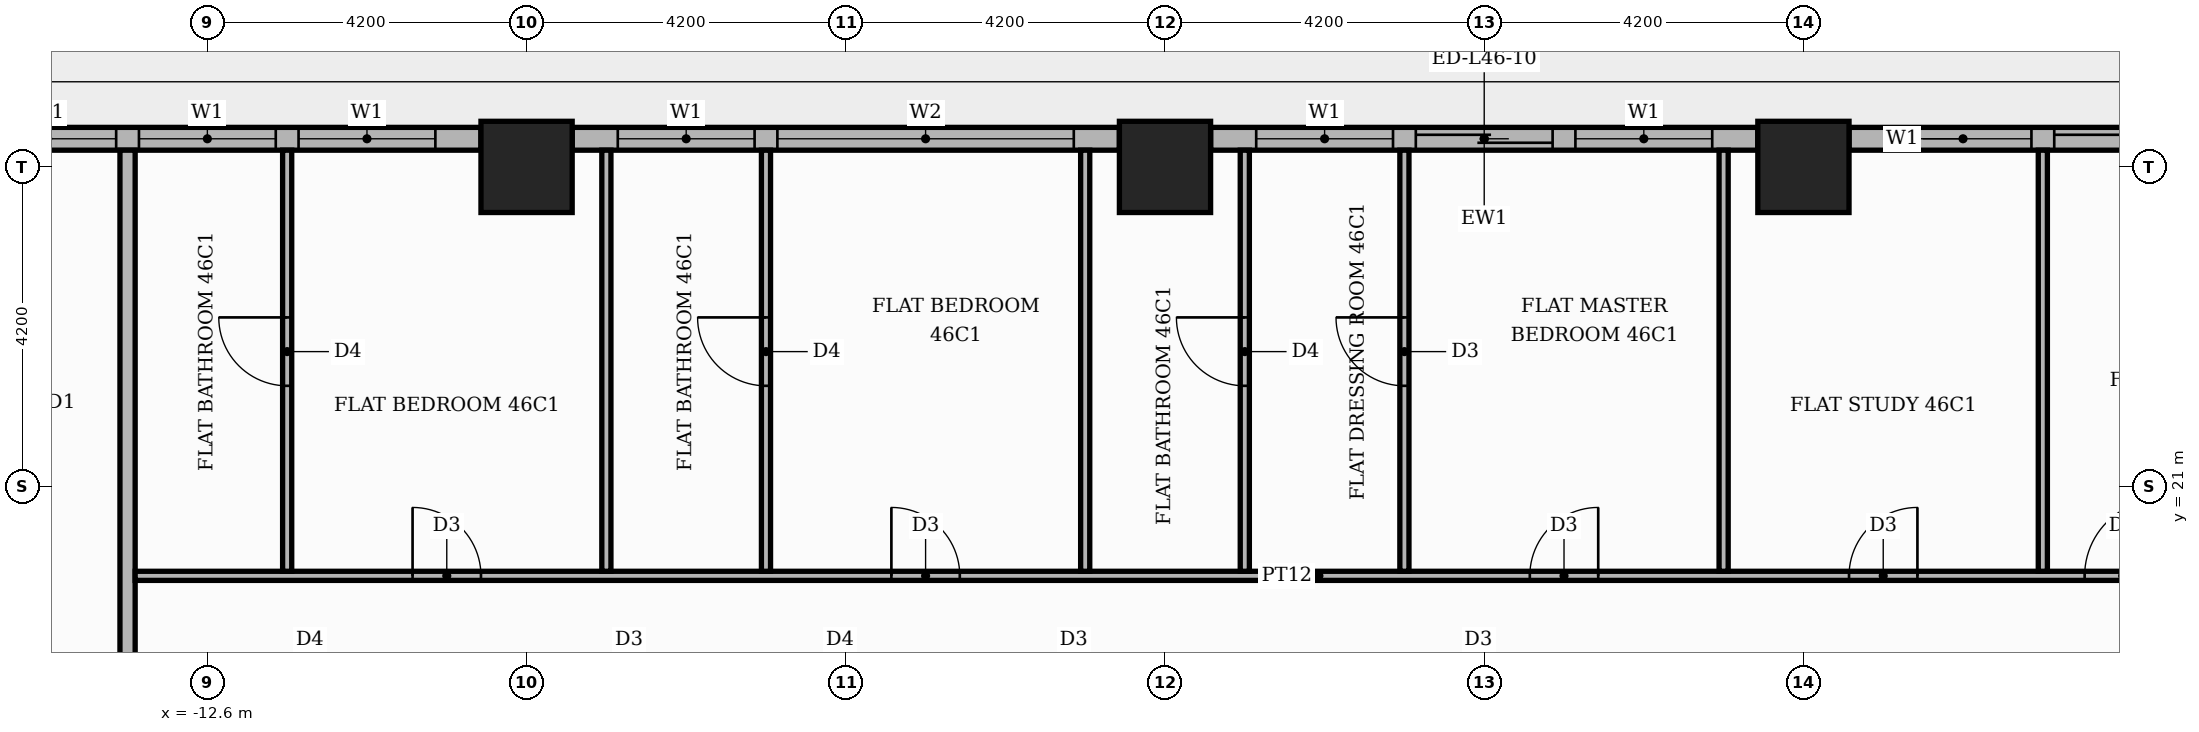
"""IFC4 building model, lengths in metres.
Left out: names, types, materials, properties, quantities, classifications, styles, units other than length and angle.
Written with IfcOpenShell. Run it as: python <this file> out.ifc"""

import sys

from ifc_helpers import new_model, si_unit, direction, frame, frame_2d, origin, origin_2d, place, context, subcontext, project, spatial, rectangle, extrude, element, fill, save


model = new_model("IFC4")
c1 = context("Model", 3, precision=1e-05, world=origin(), true_north=direction((0.0, 1.0)))
c2 = subcontext(c1, "Body", "Model", "MODEL_VIEW")
j1 = project(units=[si_unit("LENGTHUNIT", "METRE"), si_unit("PLANEANGLEUNIT", "RADIAN")], contexts=[c1])
p1 = place(None, origin())
s1 = spatial("IfcSite", under=j1, at=p1, CompositionType="ELEMENT")
p2 = place(p1, origin())
s2 = spatial("IfcBuilding", under=s1, at=p2, CompositionType="ELEMENT")
p3 = place(p2, frame((0.0, 0.0, 196.2)))
s3 = spatial("IfcBuildingStorey", under=s2, at=p3, CompositionType="ELEMENT", Elevation=196.2)
for number, where, z_axis, x_axis in (
    (1, (0.0, 25.2, 0.0), (0.0, 0.0, 1.0), (1.0, 0.0, 0.0)),
    (2, (-8.4, 25.2, 0.0), (0.0, 0.0, 1.0), (1.0, 0.0, 0.0)),
    (3, (8.4, 25.2, 0.0), (0.0, 0.0, 1.0), (1.0, 0.0, 0.0)),
):
    element("IfcColumn", number, at=place(p3, frame(where, z_axis=z_axis, x_axis=x_axis)), inside=s3, PredefinedType="COLUMN", context=c2, shape_type="SweptSolid", body=[
        extrude(rectangle(XDim=1.2, YDim=1.2, at=origin_2d()), origin(), (0.0, 0.0, 1.0), 3.9),
    ])
p4 = place(p3, frame((16.2, 25.57, 0.0), z_axis=(0.0, 0.0, 1.0), x_axis=(-1.0, 0.0, 0.0)))
e4 = element("IfcWall", 4, at=p4, inside=s3, PredefinedType="STANDARD", context=c2, shape_type="SweptSolid", body=[
    extrude(rectangle(XDim=7.2, YDim=0.3, at=frame_2d((3.6, 0.0))), origin(), (0.0, 0.0, 1.0), 3.48),
])
p5 = place(p4, frame((0.6, 0.0, 0.0)))
e5 = element("IfcOpeningElement", 5, at=p5, cuts=e4, PredefinedType="OPENING", context=c2, shape_type="SweptSolid", body=[
    extrude(rectangle(XDim=3.9, YDim=2.4, at=frame_2d((1.95, 1.2))), frame((0.0, 0.16, 0.0), z_axis=(0.0, -1.0, 0.0), x_axis=(1.0, 0.0, 0.0)), (0.0, 0.0, 1.0), 0.32),
])
p6 = place(p4, frame((4.8, 0.0, 0.9)))
e6 = element("IfcOpeningElement", 6, at=p6, cuts=e4, PredefinedType="OPENING", context=c2, shape_type="SweptSolid", body=[
    extrude(rectangle(XDim=1.8, YDim=2.1, at=frame_2d((0.9, 1.05))), frame((0.0, 0.16, 0.0), z_axis=(0.0, -1.0, 0.0), x_axis=(1.0, 0.0, 0.0)), (0.0, 0.0, 1.0), 0.32),
])
p7 = place(p3, frame((7.8, 25.57, 0.0), z_axis=(0.0, 0.0, 1.0), x_axis=(-1.0, 0.0, 0.0)))
e7 = element("IfcWall", 7, at=p7, inside=s3, PredefinedType="STANDARD", context=c2, shape_type="SweptSolid", body=[
    extrude(rectangle(XDim=7.2, YDim=0.3, at=frame_2d((3.6, 0.0))), origin(), (0.0, 0.0, 1.0), 3.48),
])
p8 = place(p7, frame((0.6, 0.0, 0.9)))
e8 = element("IfcOpeningElement", 8, at=p8, cuts=e7, PredefinedType="OPENING", context=c2, shape_type="SweptSolid", body=[
    extrude(rectangle(XDim=1.8, YDim=2.1, at=frame_2d((0.9, 1.05))), frame((0.0, 0.16, 0.0), z_axis=(0.0, -1.0, 0.0), x_axis=(1.0, 0.0, 0.0)), (0.0, 0.0, 1.0), 0.32),
])
p9 = place(p7, frame((2.7, 0.0, 0.0)))
e9 = element("IfcOpeningElement", 9, at=p9, cuts=e7, PredefinedType="OPENING", context=c2, shape_type="SweptSolid", body=[
    extrude(rectangle(XDim=1.8, YDim=2.4, at=frame_2d((0.9, 1.2))), frame((0.0, 0.16, 0.0), z_axis=(0.0, -1.0, 0.0), x_axis=(1.0, 0.0, 0.0)), (0.0, 0.0, 1.0), 0.32),
])
p10 = place(p7, frame((4.8, 0.0, 0.9)))
e10 = element("IfcOpeningElement", 10, at=p10, cuts=e7, PredefinedType="OPENING", context=c2, shape_type="SweptSolid", body=[
    extrude(rectangle(XDim=1.8, YDim=2.1, at=frame_2d((0.9, 1.05))), frame((0.0, 0.16, 0.0), z_axis=(0.0, -1.0, 0.0), x_axis=(1.0, 0.0, 0.0)), (0.0, 0.0, 1.0), 0.32),
])
p11 = place(p3, frame((-0.6, 25.57, 0.0), z_axis=(0.0, 0.0, 1.0), x_axis=(-1.0, 0.0, 0.0)))
e11 = element("IfcWall", 11, at=p11, inside=s3, PredefinedType="STANDARD", context=c2, shape_type="SweptSolid", body=[
    extrude(rectangle(XDim=7.2, YDim=0.3, at=frame_2d((3.6, 0.0))), origin(), (0.0, 0.0, 1.0), 3.48),
])
p12 = place(p11, frame((0.6, 0.0, 0.9)))
e12 = element("IfcOpeningElement", 12, at=p12, cuts=e11, PredefinedType="OPENING", context=c2, shape_type="SweptSolid", body=[
    extrude(rectangle(XDim=3.9, YDim=2.1, at=frame_2d((1.95, 1.05))), frame((0.0, 0.16, 0.0), z_axis=(0.0, -1.0, 0.0), x_axis=(1.0, 0.0, 0.0)), (0.0, 0.0, 1.0), 0.32),
])
p13 = place(p11, frame((4.8, 0.0, 0.9)))
e13 = element("IfcOpeningElement", 13, at=p13, cuts=e11, PredefinedType="OPENING", context=c2, shape_type="SweptSolid", body=[
    extrude(rectangle(XDim=1.8, YDim=2.1, at=frame_2d((0.9, 1.05))), frame((0.0, 0.16, 0.0), z_axis=(0.0, -1.0, 0.0), x_axis=(1.0, 0.0, 0.0)), (0.0, 0.0, 1.0), 0.32),
])
p14 = place(p3, frame((-9.0, 25.57, 0.0), z_axis=(0.0, 0.0, 1.0), x_axis=(-1.0, 0.0, 0.0)))
e14 = element("IfcWall", 14, at=p14, inside=s3, PredefinedType="STANDARD", context=c2, shape_type="SweptSolid", body=[
    extrude(rectangle(XDim=7.2, YDim=0.3, at=frame_2d((3.6, 0.0))), origin(), (0.0, 0.0, 1.0), 3.48),
])
p15 = place(p14, frame((0.6, 0.0, 0.9)))
e15 = element("IfcOpeningElement", 15, at=p15, cuts=e14, PredefinedType="OPENING", context=c2, shape_type="SweptSolid", body=[
    extrude(rectangle(XDim=1.8, YDim=2.1, at=frame_2d((0.9, 1.05))), frame((0.0, 0.16, 0.0), z_axis=(0.0, -1.0, 0.0), x_axis=(1.0, 0.0, 0.0)), (0.0, 0.0, 1.0), 0.32),
])
p16 = place(p14, frame((2.7, 0.0, 0.9)))
e16 = element("IfcOpeningElement", 16, at=p16, cuts=e14, PredefinedType="OPENING", context=c2, shape_type="SweptSolid", body=[
    extrude(rectangle(XDim=1.8, YDim=2.1, at=frame_2d((0.9, 1.05))), frame((0.0, 0.16, 0.0), z_axis=(0.0, -1.0, 0.0), x_axis=(1.0, 0.0, 0.0)), (0.0, 0.0, 1.0), 0.32),
])
p17 = place(p14, frame((4.8, 0.0, 0.9)))
e17 = element("IfcOpeningElement", 17, at=p17, cuts=e14, PredefinedType="OPENING", context=c2, shape_type="SweptSolid", body=[
    extrude(rectangle(XDim=1.8, YDim=2.1, at=frame_2d((0.9, 1.05))), frame((0.0, 0.16, 0.0), z_axis=(0.0, -1.0, 0.0), x_axis=(1.0, 0.0, 0.0)), (0.0, 0.0, 1.0), 0.32),
])
p18 = place(p3, frame((-13.65, 13.75, 0.0), z_axis=(0.0, 0.0, 1.0), x_axis=(0.0, 1.0, 0.0)))
e18 = element("IfcWall", 18, at=p18, inside=s3, PredefinedType="PARTITIONING", context=c2, shape_type="SweptSolid", body=[
    extrude(rectangle(XDim=11.67, YDim=0.2, at=frame_2d((5.835, 0.0))), origin(), (0.0, 0.0, 1.0), 3.48),
])
p19 = place(p3, frame((-13.55, 19.82, 0.0), z_axis=(0.0, 0.0, 1.0), x_axis=(1.0, 0.0, 0.0)))
e19 = element("IfcWall", 19, at=p19, inside=s3, PredefinedType="PARTITIONING", context=c2, shape_type="SweptSolid", body=[
    extrude(rectangle(XDim=31.15, YDim=0.12, at=frame_2d((15.575, 0.0))), origin(), (0.0, 0.0, 1.0), 3.48),
])
p20 = place(p19, frame((25.65, 0.0, 0.0)))
e20 = element("IfcOpeningElement", 20, at=p20, cuts=e19, PredefinedType="OPENING", context=c2, shape_type="SweptSolid", body=[
    extrude(rectangle(XDim=1.0, YDim=2.1, at=frame_2d((0.5, 1.05))), frame((0.0, 0.07, 0.0), z_axis=(0.0, -1.0, 0.0), x_axis=(1.0, 0.0, 0.0)), (0.0, 0.0, 1.0), 0.14),
])
p21 = place(p19, frame((22.55, 0.0, 0.0)))
e21 = element("IfcOpeningElement", 21, at=p21, cuts=e19, PredefinedType="OPENING", context=c2, shape_type="SweptSolid", body=[
    extrude(rectangle(XDim=0.9, YDim=2.1, at=frame_2d((0.45, 1.05))), frame((0.0, 0.07, 0.0), z_axis=(0.0, -1.0, 0.0), x_axis=(1.0, 0.0, 0.0)), (0.0, 0.0, 1.0), 0.14),
])
p22 = place(p19, frame((18.35, 0.0, 0.0)))
e22 = element("IfcOpeningElement", 22, at=p22, cuts=e19, PredefinedType="OPENING", context=c2, shape_type="SweptSolid", body=[
    extrude(rectangle(XDim=0.9, YDim=2.1, at=frame_2d((0.45, 1.05))), frame((0.0, 0.07, 0.0), z_axis=(0.0, -1.0, 0.0), x_axis=(1.0, 0.0, 0.0)), (0.0, 0.0, 1.0), 0.14),
])
p23 = place(p19, frame((9.95, 0.0, 0.0)))
e23 = element("IfcOpeningElement", 23, at=p23, cuts=e19, PredefinedType="OPENING", context=c2, shape_type="SweptSolid", body=[
    extrude(rectangle(XDim=0.9, YDim=2.1, at=frame_2d((0.45, 1.05))), frame((0.0, 0.07, 0.0), z_axis=(0.0, -1.0, 0.0), x_axis=(1.0, 0.0, 0.0)), (0.0, 0.0, 1.0), 0.14),
])
p24 = place(p19, frame((3.65, 0.0, 0.0)))
e24 = element("IfcOpeningElement", 24, at=p24, cuts=e19, PredefinedType="OPENING", context=c2, shape_type="SweptSolid", body=[
    extrude(rectangle(XDim=0.9, YDim=2.1, at=frame_2d((0.45, 1.05))), frame((0.0, 0.07, 0.0), z_axis=(0.0, -1.0, 0.0), x_axis=(1.0, 0.0, 0.0)), (0.0, 0.0, 1.0), 0.14),
])
p25 = place(p3, frame((-11.55, 19.88, 0.0), z_axis=(0.0, 0.0, 1.0), x_axis=(0.0, 1.0, 0.0)))
e25 = element("IfcWall", 25, at=p25, inside=s3, PredefinedType="PARTITIONING", context=c2, shape_type="SweptSolid", body=[
    extrude(rectangle(XDim=5.54, YDim=0.12, at=frame_2d((2.77, 0.0))), origin(), (0.0, 0.0, 1.0), 3.48),
])
p26 = place(p25, frame((2.44, 0.0, 0.0)))
e26 = element("IfcOpeningElement", 26, at=p26, cuts=e25, PredefinedType="OPENING", context=c2, shape_type="SweptSolid", body=[
    extrude(rectangle(XDim=0.9, YDim=2.1, at=frame_2d((0.45, 1.05))), frame((0.0, 0.07, 0.0), z_axis=(0.0, -1.0, 0.0), x_axis=(1.0, 0.0, 0.0)), (0.0, 0.0, 1.0), 0.14),
])
p27 = place(p3, frame((-7.35, 19.88, 0.0), z_axis=(0.0, 0.0, 1.0), x_axis=(0.0, 1.0, 0.0)))
e27 = element("IfcWall", 27, at=p27, inside=s3, PredefinedType="PARTITIONING", context=c2, shape_type="SweptSolid", body=[
    extrude(rectangle(XDim=5.54, YDim=0.12, at=frame_2d((2.77, 0.0))), origin(), (0.0, 0.0, 1.0), 3.48),
])
p28 = place(p3, frame((-5.25, 19.88, 0.0), z_axis=(0.0, 0.0, 1.0), x_axis=(0.0, 1.0, 0.0)))
e28 = element("IfcWall", 28, at=p28, inside=s3, PredefinedType="PARTITIONING", context=c2, shape_type="SweptSolid", body=[
    extrude(rectangle(XDim=5.54, YDim=0.12, at=frame_2d((2.77, 0.0))), origin(), (0.0, 0.0, 1.0), 3.48),
])
p29 = place(p28, frame((2.44, 0.0, 0.0)))
e29 = element("IfcOpeningElement", 29, at=p29, cuts=e28, PredefinedType="OPENING", context=c2, shape_type="SweptSolid", body=[
    extrude(rectangle(XDim=0.9, YDim=2.1, at=frame_2d((0.45, 1.05))), frame((0.0, 0.07, 0.0), z_axis=(0.0, -1.0, 0.0), x_axis=(1.0, 0.0, 0.0)), (0.0, 0.0, 1.0), 0.14),
])
p30 = place(p3, frame((-1.05, 19.88, 0.0), z_axis=(0.0, 0.0, 1.0), x_axis=(0.0, 1.0, 0.0)))
e30 = element("IfcWall", 30, at=p30, inside=s3, PredefinedType="PARTITIONING", context=c2, shape_type="SweptSolid", body=[
    extrude(rectangle(XDim=5.54, YDim=0.12, at=frame_2d((2.77, 0.0))), origin(), (0.0, 0.0, 1.0), 3.48),
])
p31 = place(p3, frame((1.05, 19.88, 0.0), z_axis=(0.0, 0.0, 1.0), x_axis=(0.0, 1.0, 0.0)))
e31 = element("IfcWall", 31, at=p31, inside=s3, PredefinedType="PARTITIONING", context=c2, shape_type="SweptSolid", body=[
    extrude(rectangle(XDim=5.54, YDim=0.12, at=frame_2d((2.77, 0.0))), origin(), (0.0, 0.0, 1.0), 3.48),
])
p32 = place(p31, frame((2.44, 0.0, 0.0)))
e32 = element("IfcOpeningElement", 32, at=p32, cuts=e31, PredefinedType="OPENING", context=c2, shape_type="SweptSolid", body=[
    extrude(rectangle(XDim=0.9, YDim=2.1, at=frame_2d((0.45, 1.05))), frame((0.0, 0.07, 0.0), z_axis=(0.0, -1.0, 0.0), x_axis=(1.0, 0.0, 0.0)), (0.0, 0.0, 1.0), 0.14),
])
p33 = place(p3, frame((3.15, 19.88, 0.0), z_axis=(0.0, 0.0, 1.0), x_axis=(0.0, 1.0, 0.0)))
e33 = element("IfcWall", 33, at=p33, inside=s3, PredefinedType="PARTITIONING", context=c2, shape_type="SweptSolid", body=[
    extrude(rectangle(XDim=5.54, YDim=0.12, at=frame_2d((2.77, 0.0))), origin(), (0.0, 0.0, 1.0), 3.48),
])
p34 = place(p33, frame((2.44, 0.0, 0.0)))
e34 = element("IfcOpeningElement", 34, at=p34, cuts=e33, PredefinedType="OPENING", context=c2, shape_type="SweptSolid", body=[
    extrude(rectangle(XDim=0.9, YDim=2.1, at=frame_2d((0.45, 1.05))), frame((0.0, 0.07, 0.0), z_axis=(0.0, -1.0, 0.0), x_axis=(1.0, 0.0, 0.0)), (0.0, 0.0, 1.0), 0.14),
])
for number, where, z_axis, x_axis in (
    (35, (7.35, 19.88, 0.0), (0.0, 0.0, 1.0), (0.0, 1.0, 0.0)),
    (36, (11.55, 19.88, 0.0), (0.0, 0.0, 1.0), (0.0, 1.0, 0.0)),
):
    element("IfcWall", number, at=place(p3, frame(where, z_axis=z_axis, x_axis=x_axis)), inside=s3, PredefinedType="PARTITIONING", context=c2, shape_type="SweptSolid", body=[
        extrude(rectangle(XDim=5.54, YDim=0.12, at=frame_2d((2.77, 0.0))), origin(), (0.0, 0.0, 1.0), 3.48),
    ])
p35 = place(p5, origin())
e37 = element("IfcDoor", 37, at=p35, inside=s3, OperationType="SLIDING_TO_LEFT", PredefinedType="DOOR", context=c2, shape_type="SweptSolid", body=[
    extrude(rectangle(XDim=3.9, YDim=2.4, at=frame_2d((1.95, 1.2))), frame((0.0, 0.025, 0.0), z_axis=(0.0, -1.0, 0.0), x_axis=(1.0, 0.0, 0.0)), (0.0, 0.0, 1.0), 0.05),
])
fill(e5, e37)
p36 = place(p6, origin())
e38 = element("IfcWindow", 38, at=p36, inside=s3, PartitioningType="SINGLE_PANEL", PredefinedType="WINDOW", context=c2, shape_type="SweptSolid", body=[
    extrude(rectangle(XDim=1.8, YDim=2.1, at=frame_2d((0.9, 1.05))), frame((0.0, 0.03, 0.0), z_axis=(0.0, -1.0, 0.0), x_axis=(1.0, 0.0, 0.0)), (0.0, 0.0, 1.0), 0.06),
])
fill(e6, e38)
p37 = place(p8, origin())
e39 = element("IfcWindow", 39, at=p37, inside=s3, PartitioningType="SINGLE_PANEL", PredefinedType="WINDOW", context=c2, shape_type="SweptSolid", body=[
    extrude(rectangle(XDim=1.8, YDim=2.1, at=frame_2d((0.9, 1.05))), frame((0.0, 0.03, 0.0), z_axis=(0.0, -1.0, 0.0), x_axis=(1.0, 0.0, 0.0)), (0.0, 0.0, 1.0), 0.06),
])
fill(e8, e39)
p38 = place(p9, origin())
e40 = element("IfcDoor", 40, at=p38, inside=s3, OperationType="SLIDING_TO_LEFT", PredefinedType="DOOR", context=c2, shape_type="SweptSolid", body=[
    extrude(rectangle(XDim=1.8, YDim=2.4, at=frame_2d((0.9, 1.2))), frame((0.0, 0.025, 0.0), z_axis=(0.0, -1.0, 0.0), x_axis=(1.0, 0.0, 0.0)), (0.0, 0.0, 1.0), 0.05),
])
fill(e9, e40)
p39 = place(p10, origin())
e41 = element("IfcWindow", 41, at=p39, inside=s3, PartitioningType="SINGLE_PANEL", PredefinedType="WINDOW", context=c2, shape_type="SweptSolid", body=[
    extrude(rectangle(XDim=1.8, YDim=2.1, at=frame_2d((0.9, 1.05))), frame((0.0, 0.03, 0.0), z_axis=(0.0, -1.0, 0.0), x_axis=(1.0, 0.0, 0.0)), (0.0, 0.0, 1.0), 0.06),
])
fill(e10, e41)
p40 = place(p12, origin())
e42 = element("IfcWindow", 42, at=p40, inside=s3, PartitioningType="SINGLE_PANEL", PredefinedType="WINDOW", context=c2, shape_type="SweptSolid", body=[
    extrude(rectangle(XDim=3.9, YDim=2.1, at=frame_2d((1.95, 1.05))), frame((0.0, 0.03, 0.0), z_axis=(0.0, -1.0, 0.0), x_axis=(1.0, 0.0, 0.0)), (0.0, 0.0, 1.0), 0.06),
])
fill(e12, e42)
p41 = place(p13, origin())
e43 = element("IfcWindow", 43, at=p41, inside=s3, PartitioningType="SINGLE_PANEL", PredefinedType="WINDOW", context=c2, shape_type="SweptSolid", body=[
    extrude(rectangle(XDim=1.8, YDim=2.1, at=frame_2d((0.9, 1.05))), frame((0.0, 0.03, 0.0), z_axis=(0.0, -1.0, 0.0), x_axis=(1.0, 0.0, 0.0)), (0.0, 0.0, 1.0), 0.06),
])
fill(e13, e43)
p42 = place(p15, origin())
e44 = element("IfcWindow", 44, at=p42, inside=s3, PartitioningType="SINGLE_PANEL", PredefinedType="WINDOW", context=c2, shape_type="SweptSolid", body=[
    extrude(rectangle(XDim=1.8, YDim=2.1, at=frame_2d((0.9, 1.05))), frame((0.0, 0.03, 0.0), z_axis=(0.0, -1.0, 0.0), x_axis=(1.0, 0.0, 0.0)), (0.0, 0.0, 1.0), 0.06),
])
fill(e15, e44)
p43 = place(p16, origin())
e45 = element("IfcWindow", 45, at=p43, inside=s3, PartitioningType="SINGLE_PANEL", PredefinedType="WINDOW", context=c2, shape_type="SweptSolid", body=[
    extrude(rectangle(XDim=1.8, YDim=2.1, at=frame_2d((0.9, 1.05))), frame((0.0, 0.03, 0.0), z_axis=(0.0, -1.0, 0.0), x_axis=(1.0, 0.0, 0.0)), (0.0, 0.0, 1.0), 0.06),
])
fill(e16, e45)
p44 = place(p17, origin())
e46 = element("IfcWindow", 46, at=p44, inside=s3, PartitioningType="SINGLE_PANEL", PredefinedType="WINDOW", context=c2, shape_type="SweptSolid", body=[
    extrude(rectangle(XDim=1.8, YDim=2.1, at=frame_2d((0.9, 1.05))), frame((0.0, 0.03, 0.0), z_axis=(0.0, -1.0, 0.0), x_axis=(1.0, 0.0, 0.0)), (0.0, 0.0, 1.0), 0.06),
])
fill(e17, e46)
p45 = place(p20, origin())
e47 = element("IfcDoor", 47, at=p45, inside=s3, OperationType="SINGLE_SWING_RIGHT", PredefinedType="DOOR", context=c2, shape_type="SweptSolid", body=[
    extrude(rectangle(XDim=1.0, YDim=2.1, at=frame_2d((0.5, 1.05))), frame((0.0, 0.025, 0.0), z_axis=(0.0, -1.0, 0.0), x_axis=(1.0, 0.0, 0.0)), (0.0, 0.0, 1.0), 0.05),
])
fill(e20, e47)
p46 = place(p21, origin())
e48 = element("IfcDoor", 48, at=p46, inside=s3, OperationType="SINGLE_SWING_RIGHT", PredefinedType="DOOR", context=c2, shape_type="SweptSolid", body=[
    extrude(rectangle(XDim=0.9, YDim=2.1, at=frame_2d((0.45, 1.05))), frame((0.0, 0.025, 0.0), z_axis=(0.0, -1.0, 0.0), x_axis=(1.0, 0.0, 0.0)), (0.0, 0.0, 1.0), 0.05),
])
fill(e21, e48)
p47 = place(p22, origin())
e49 = element("IfcDoor", 49, at=p47, inside=s3, OperationType="SINGLE_SWING_RIGHT", PredefinedType="DOOR", context=c2, shape_type="SweptSolid", body=[
    extrude(rectangle(XDim=0.9, YDim=2.1, at=frame_2d((0.45, 1.05))), frame((0.0, 0.025, 0.0), z_axis=(0.0, -1.0, 0.0), x_axis=(1.0, 0.0, 0.0)), (0.0, 0.0, 1.0), 0.05),
])
fill(e22, e49)
p48 = place(p34, origin())
e50 = element("IfcDoor", 50, at=p48, inside=s3, OperationType="SINGLE_SWING_RIGHT", PredefinedType="DOOR", context=c2, shape_type="SweptSolid", body=[
    extrude(rectangle(XDim=0.9, YDim=2.1, at=frame_2d((0.45, 1.05))), frame((0.0, 0.025, 0.0), z_axis=(0.0, -1.0, 0.0), x_axis=(1.0, 0.0, 0.0)), (0.0, 0.0, 1.0), 0.05),
])
fill(e34, e50)
p49 = place(p32, origin())
e51 = element("IfcDoor", 51, at=p49, inside=s3, OperationType="SINGLE_SWING_RIGHT", PredefinedType="DOOR", context=c2, shape_type="SweptSolid", body=[
    extrude(rectangle(XDim=0.9, YDim=2.1, at=frame_2d((0.45, 1.05))), frame((0.0, 0.025, 0.0), z_axis=(0.0, -1.0, 0.0), x_axis=(1.0, 0.0, 0.0)), (0.0, 0.0, 1.0), 0.05),
])
fill(e32, e51)
p50 = place(p23, origin())
e52 = element("IfcDoor", 52, at=p50, inside=s3, OperationType="SINGLE_SWING_LEFT", PredefinedType="DOOR", context=c2, shape_type="SweptSolid", body=[
    extrude(rectangle(XDim=0.9, YDim=2.1, at=frame_2d((0.45, 1.05))), frame((0.0, 0.025, 0.0), z_axis=(0.0, -1.0, 0.0), x_axis=(1.0, 0.0, 0.0)), (0.0, 0.0, 1.0), 0.05),
])
fill(e23, e52)
p51 = place(p29, origin())
e53 = element("IfcDoor", 53, at=p51, inside=s3, OperationType="SINGLE_SWING_RIGHT", PredefinedType="DOOR", context=c2, shape_type="SweptSolid", body=[
    extrude(rectangle(XDim=0.9, YDim=2.1, at=frame_2d((0.45, 1.05))), frame((0.0, 0.025, 0.0), z_axis=(0.0, -1.0, 0.0), x_axis=(1.0, 0.0, 0.0)), (0.0, 0.0, 1.0), 0.05),
])
fill(e29, e53)
p52 = place(p24, origin())
e54 = element("IfcDoor", 54, at=p52, inside=s3, OperationType="SINGLE_SWING_LEFT", PredefinedType="DOOR", context=c2, shape_type="SweptSolid", body=[
    extrude(rectangle(XDim=0.9, YDim=2.1, at=frame_2d((0.45, 1.05))), frame((0.0, 0.025, 0.0), z_axis=(0.0, -1.0, 0.0), x_axis=(1.0, 0.0, 0.0)), (0.0, 0.0, 1.0), 0.05),
])
fill(e24, e54)
p53 = place(p26, origin())
e55 = element("IfcDoor", 55, at=p53, inside=s3, OperationType="SINGLE_SWING_RIGHT", PredefinedType="DOOR", context=c2, shape_type="SweptSolid", body=[
    extrude(rectangle(XDim=0.9, YDim=2.1, at=frame_2d((0.45, 1.05))), frame((0.0, 0.025, 0.0), z_axis=(0.0, -1.0, 0.0), x_axis=(1.0, 0.0, 0.0)), (0.0, 0.0, 1.0), 0.05),
])
fill(e26, e55)
save(model, sys.argv[1])
